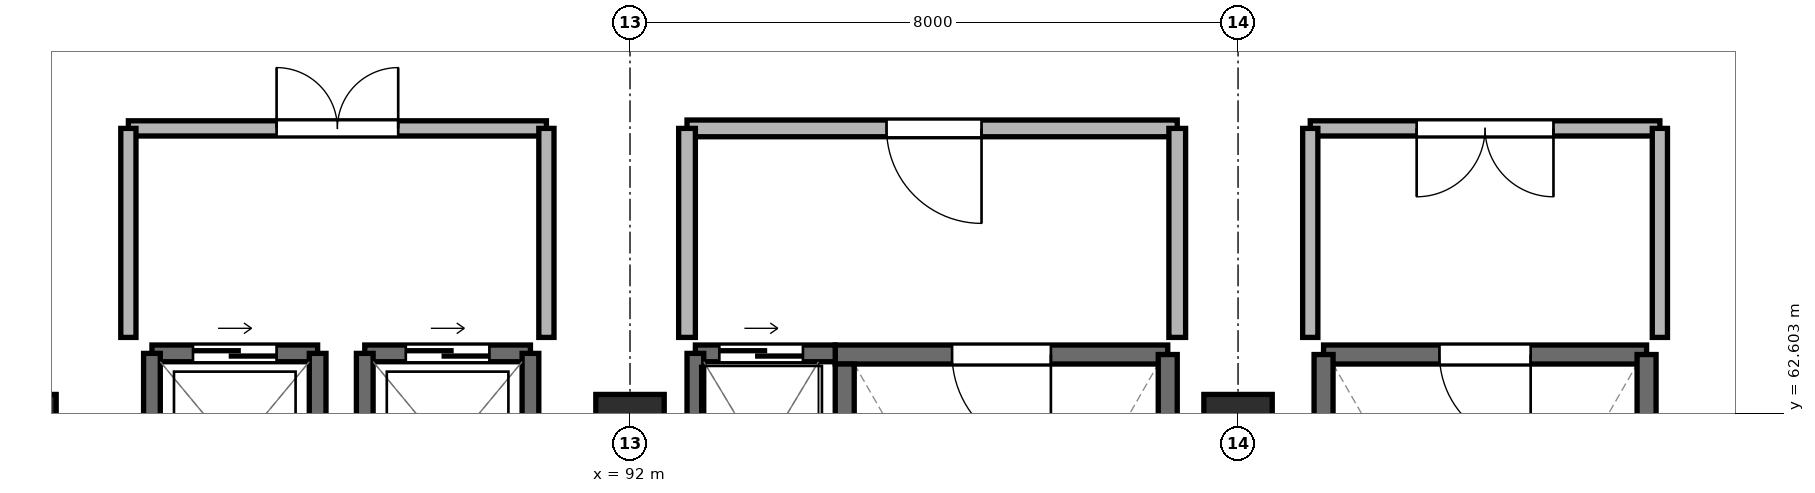
"""IFC4 building model, lengths in metres.
Left out: names, types, materials, properties, quantities, classifications, styles, units other than length and angle.
Written with IfcOpenShell. Run it as: python <this file> out.ifc"""

import sys

from ifc_helpers import new_model, si_unit, direction, frame, frame_2d, origin, origin_2d, place, context, subcontext, project, spatial, rectangle, extrude, element, fill, save


model = new_model("IFC4")
c1 = context("Model", 3, precision=1e-05, world=origin(), true_north=direction((0.0, 1.0)))
c2 = subcontext(c1, "Body", "Model", "MODEL_VIEW")
j1 = project(units=[si_unit("LENGTHUNIT", "METRE"), si_unit("PLANEANGLEUNIT", "RADIAN")], contexts=[c1])
p1 = place(None, origin())
s1 = spatial("IfcSite", under=j1, at=p1, CompositionType="ELEMENT")
p2 = place(p1, origin())
s2 = spatial("IfcBuilding", under=s1, at=p2, CompositionType="ELEMENT")
p3 = place(p2, frame((0.0, 0.0, 30.8)))
s3 = spatial("IfcBuildingStorey", under=s2, at=p3, CompositionType="ELEMENT", Elevation=30.8)
for number, where, z_axis, x_axis in (
    (1, (84.0, 62.4, -0.26), (0.0, 0.0, 1.0), (1.0, 0.0, 0.0)),
    (2, (92.0, 62.4, -0.26), (0.0, 0.0, 1.0), (1.0, 0.0, 0.0)),
    (3, (100.0, 62.4, -0.26), (0.0, 0.0, 1.0), (1.0, 0.0, 0.0)),
):
    element("IfcColumn", number, at=place(p3, frame(where, z_axis=z_axis, x_axis=x_axis)), inside=s3, PredefinedType="COLUMN", context=c2, shape_type="SweptSolid", body=[
        extrude(rectangle(XDim=0.9, YDim=0.9, at=origin_2d()), origin(), (0.0, 0.0, 1.0), 3.26),
    ])
p4 = place(p3, frame((99.075, 63.375, 0.0), z_axis=(0.0, 0.0, 1.0), x_axis=(-1.0, 0.0, 0.0)))
e4 = element("IfcWall", 4, at=p4, inside=s3, PredefinedType="SHEAR", context=c2, shape_type="SweptSolid", body=[
    extrude(rectangle(XDim=4.375, YDim=0.25, at=frame_2d((2.188, 0.0))), origin(), (0.0, 0.0, 1.0), 3.0),
])
p5 = place(p4, frame((1.538, 0.0, 0.0)))
e5 = element("IfcOpeningElement", 5, at=p5, cuts=e4, PredefinedType="OPENING", context=c2, shape_type="SweptSolid", body=[
    extrude(rectangle(XDim=1.3, YDim=2.2, at=frame_2d((0.65, 1.1))), frame((0.0, 0.137, 0.0), z_axis=(0.0, -1.0, 0.0), x_axis=(1.0, 0.0, 0.0)), (0.0, 0.0, 1.0), 0.274),
])
p6 = place(p3, frame((94.825, 63.25, 0.0), z_axis=(0.0, 0.0, 1.0), x_axis=(0.0, -1.0, 0.0)))
e6 = element("IfcWall", 6, at=p6, inside=s3, PredefinedType="SHEAR", context=c2, shape_type="SweptSolid", body=[
    extrude(rectangle(XDim=7.075, YDim=0.25, at=frame_2d((3.538, 0.0))), origin(), (0.0, 0.0, 1.0), 3.0),
])
p7 = place(p3, frame((99.075, 56.175, 0.0), z_axis=(0.0, 0.0, 1.0), x_axis=(0.0, 1.0, 0.0)))
e7 = element("IfcWall", 7, at=p7, inside=s3, PredefinedType="SHEAR", context=c2, shape_type="SweptSolid", body=[
    extrude(rectangle(XDim=7.2, YDim=0.25, at=frame_2d((3.6, 0.0))), origin(), (0.0, 0.0, 1.0), 3.0),
])
p8 = place(p3, frame((105.375, 63.375, 0.0), z_axis=(0.0, 0.0, 1.0), x_axis=(-1.0, 0.0, 0.0)))
e8 = element("IfcWall", 8, at=p8, inside=s3, PredefinedType="SHEAR", context=c2, shape_type="SweptSolid", body=[
    extrude(rectangle(XDim=4.25, YDim=0.25, at=frame_2d((2.125, 0.0))), origin(), (0.0, 0.0, 1.0), 3.0),
])
p9 = place(p8, frame((1.525, 0.0, 0.0)))
e9 = element("IfcOpeningElement", 9, at=p9, cuts=e8, PredefinedType="OPENING", context=c2, shape_type="SweptSolid", body=[
    extrude(rectangle(XDim=1.2, YDim=2.2, at=frame_2d((0.6, 1.1))), frame((0.0, 0.137, 0.0), z_axis=(0.0, -1.0, 0.0), x_axis=(1.0, 0.0, 0.0)), (0.0, 0.0, 1.0), 0.274),
])
for number, where, z_axis, x_axis in (
    (10, (101.125, 63.375, 0.0), (0.0, 0.0, 1.0), (0.0, -1.0, 0.0)),
    (11, (105.375, 56.175, 0.0), (0.0, 0.0, 1.0), (0.0, 1.0, 0.0)),
):
    element("IfcWall", number, at=place(p3, frame(where, z_axis=z_axis, x_axis=x_axis)), inside=s3, PredefinedType="SHEAR", context=c2, shape_type="SweptSolid", body=[
        extrude(rectangle(XDim=7.2, YDim=0.25, at=frame_2d((3.6, 0.0))), origin(), (0.0, 0.0, 1.0), 3.0),
    ])
p10 = place(p3, frame((94.7, 63.39, 0.0), z_axis=(0.0, 0.0, 1.0), x_axis=(-1.0, 0.0, 0.0)))
e12 = element("IfcWall", 12, at=p10, inside=s3, PredefinedType="SHEAR", context=c2, shape_type="SweptSolid", body=[
    extrude(rectangle(XDim=1.84, YDim=0.22, at=frame_2d((0.92, 0.0))), origin(), (0.0, 0.0, 1.0), 3.0),
])
p11 = place(p10, frame((0.425, 0.0, 0.0)))
e13 = element("IfcOpeningElement", 13, at=p11, cuts=e12, PredefinedType="OPENING", context=c2, shape_type="SweptSolid", body=[
    extrude(rectangle(XDim=1.1, YDim=2.2, at=frame_2d((0.55, 1.1))), frame((0.0, 0.122, 0.0), z_axis=(0.0, -1.0, 0.0), x_axis=(1.0, 0.0, 0.0)), (0.0, 0.0, 1.0), 0.244),
])
p12 = place(p3, frame((92.86, 63.39, 0.0), z_axis=(0.0, 0.0, 1.0), x_axis=(0.0, -1.0, 0.0)))
e14 = element("IfcWall", 14, at=p12, inside=s3, PredefinedType="SHEAR", context=c2, shape_type="SweptSolid", body=[
    extrude(rectangle(XDim=2.73, YDim=0.22, at=frame_2d((1.365, 0.0))), origin(), (0.0, 0.0, 1.0), 3.0),
])
p13 = place(p3, frame((87.89, 63.39, 0.0), z_axis=(0.0, 0.0, 1.0), x_axis=(-1.0, 0.0, 0.0)))
e15 = element("IfcWall", 15, at=p13, inside=s3, PredefinedType="SHEAR", context=c2, shape_type="SweptSolid", body=[
    extrude(rectangle(XDim=2.18, YDim=0.22, at=frame_2d((1.09, 0.0))), origin(), (0.0, 0.0, 1.0), 3.0),
])
p14 = place(p13, frame((0.54, 0.0, 0.0)))
e16 = element("IfcOpeningElement", 16, at=p14, cuts=e15, PredefinedType="OPENING", context=c2, shape_type="SweptSolid", body=[
    extrude(rectangle(XDim=1.1, YDim=2.2, at=frame_2d((0.55, 1.1))), frame((0.0, 0.122, 0.0), z_axis=(0.0, -1.0, 0.0), x_axis=(1.0, 0.0, 0.0)), (0.0, 0.0, 1.0), 0.244),
])
for number, where, z_axis, x_axis in (
    (17, (85.71, 63.39, 0.0), (0.0, 0.0, 1.0), (0.0, -1.0, 0.0)),
    (18, (87.89, 60.81, 0.0), (0.0, 0.0, 1.0), (0.0, 1.0, 0.0)),
):
    element("IfcWall", number, at=place(p3, frame(where, z_axis=z_axis, x_axis=x_axis)), inside=s3, PredefinedType="SHEAR", context=c2, shape_type="SweptSolid", body=[
        extrude(rectangle(XDim=2.58, YDim=0.22, at=frame_2d((1.29, 0.0))), origin(), (0.0, 0.0, 1.0), 3.0),
    ])
p15 = place(p3, frame((90.69, 63.39, 0.0), z_axis=(0.0, 0.0, 1.0), x_axis=(-1.0, 0.0, 0.0)))
e19 = element("IfcWall", 19, at=p15, inside=s3, PredefinedType="SHEAR", context=c2, shape_type="SweptSolid", body=[
    extrude(rectangle(XDim=2.18, YDim=0.22, at=frame_2d((1.09, 0.0))), origin(), (0.0, 0.0, 1.0), 3.0),
])
p16 = place(p15, frame((0.54, 0.0, 0.0)))
e20 = element("IfcOpeningElement", 20, at=p16, cuts=e19, PredefinedType="OPENING", context=c2, shape_type="SweptSolid", body=[
    extrude(rectangle(XDim=1.1, YDim=2.2, at=frame_2d((0.55, 1.1))), frame((0.0, 0.122, 0.0), z_axis=(0.0, -1.0, 0.0), x_axis=(1.0, 0.0, 0.0)), (0.0, 0.0, 1.0), 0.244),
])
for number, where, z_axis, x_axis in (
    (21, (88.51, 63.39, 0.0), (0.0, 0.0, 1.0), (0.0, -1.0, 0.0)),
    (22, (90.69, 60.81, 0.0), (0.0, 0.0, 1.0), (0.0, 1.0, 0.0)),
):
    element("IfcWall", number, at=place(p3, frame(where, z_axis=z_axis, x_axis=x_axis)), inside=s3, PredefinedType="SHEAR", context=c2, shape_type="SweptSolid", body=[
        extrude(rectangle(XDim=2.58, YDim=0.22, at=frame_2d((1.29, 0.0))), origin(), (0.0, 0.0, 1.0), 3.0),
    ])
p17 = place(p3, frame((92.75, 66.35, 0.0), z_axis=(0.0, 0.0, 1.0), x_axis=(1.0, 0.0, 0.0)))
e23 = element("IfcWall", 23, at=p17, inside=s3, PredefinedType="PARTITIONING", context=c2, shape_type="SweptSolid", body=[
    extrude(rectangle(XDim=6.45, YDim=0.22, at=frame_2d((3.225, 0.0))), origin(), (0.0, 0.0, 1.0), 2.53),
])
p18 = place(p17, frame((2.625, 0.0, 0.0)))
e24 = element("IfcOpeningElement", 24, at=p18, cuts=e23, PredefinedType="OPENING", context=c2, shape_type="SweptSolid", body=[
    extrude(rectangle(XDim=1.25, YDim=2.2, at=frame_2d((0.625, 1.1))), frame((0.0, 0.122, 0.0), z_axis=(0.0, -1.0, 0.0), x_axis=(1.0, 0.0, 0.0)), (0.0, 0.0, 1.0), 0.244),
])
for number, where, z_axis, x_axis in (
    (25, (92.75, 63.6, 0.0), (0.0, 0.0, 1.0), (0.0, 1.0, 0.0)),
    (26, (99.2, 63.6, 0.0), (0.0, 0.0, 1.0), (0.0, 1.0, 0.0)),
):
    element("IfcWall", number, at=place(p3, frame(where, z_axis=z_axis, x_axis=x_axis)), inside=s3, PredefinedType="PARTITIONING", context=c2, shape_type="SweptSolid", body=[
        extrude(rectangle(XDim=2.75, YDim=0.22, at=frame_2d((1.375, 0.0))), origin(), (0.0, 0.0, 1.0), 2.53),
    ])
p19 = place(p3, frame((85.4, 66.35, 0.0), z_axis=(0.0, 0.0, 1.0), x_axis=(1.0, 0.0, 0.0)))
e27 = element("IfcWall", 27, at=p19, inside=s3, PredefinedType="PARTITIONING", context=c2, shape_type="SweptSolid", body=[
    extrude(rectangle(XDim=5.5, YDim=0.2, at=frame_2d((2.75, 0.0))), origin(), (0.0, 0.0, 1.0), 2.53),
])
p20 = place(p19, frame((1.95, 0.0, 0.0)))
e28 = element("IfcOpeningElement", 28, at=p20, cuts=e27, PredefinedType="OPENING", context=c2, shape_type="SweptSolid", body=[
    extrude(rectangle(XDim=1.6, YDim=2.2, at=frame_2d((0.8, 1.1))), frame((0.0, 0.112, 0.0), z_axis=(0.0, -1.0, 0.0), x_axis=(1.0, 0.0, 0.0)), (0.0, 0.0, 1.0), 0.224),
])
for number, where, z_axis, x_axis in (
    (29, (85.4, 63.6, 0.0), (0.0, 0.0, 1.0), (0.0, 1.0, 0.0)),
    (30, (90.9, 63.6, 0.0), (0.0, 0.0, 1.0), (0.0, 1.0, 0.0)),
):
    element("IfcWall", number, at=place(p3, frame(where, z_axis=z_axis, x_axis=x_axis)), inside=s3, PredefinedType="PARTITIONING", context=c2, shape_type="SweptSolid", body=[
        extrude(rectangle(XDim=2.75, YDim=0.2, at=frame_2d((1.375, 0.0))), origin(), (0.0, 0.0, 1.0), 2.53),
    ])
p21 = place(p3, frame((100.95, 66.35, 0.0), z_axis=(0.0, 0.0, 1.0), x_axis=(1.0, 0.0, 0.0)))
e31 = element("IfcWall", 31, at=p21, inside=s3, PredefinedType="PARTITIONING", context=c2, shape_type="SweptSolid", body=[
    extrude(rectangle(XDim=4.6, YDim=0.2, at=frame_2d((2.3, 0.0))), origin(), (0.0, 0.0, 1.0), 2.53),
])
p22 = place(p21, frame((1.4, 0.0, 0.0)))
e32 = element("IfcOpeningElement", 32, at=p22, cuts=e31, PredefinedType="OPENING", context=c2, shape_type="SweptSolid", body=[
    extrude(rectangle(XDim=1.8, YDim=2.2, at=frame_2d((0.9, 1.1))), frame((0.0, 0.112, 0.0), z_axis=(0.0, -1.0, 0.0), x_axis=(1.0, 0.0, 0.0)), (0.0, 0.0, 1.0), 0.224),
])
for number, where, z_axis, x_axis in (
    (33, (100.95, 63.6, 0.0), (0.0, 0.0, 1.0), (0.0, 1.0, 0.0)),
    (34, (105.55, 63.6, 0.0), (0.0, 0.0, 1.0), (0.0, 1.0, 0.0)),
):
    element("IfcWall", number, at=place(p3, frame(where, z_axis=z_axis, x_axis=x_axis)), inside=s3, PredefinedType="PARTITIONING", context=c2, shape_type="SweptSolid", body=[
        extrude(rectangle(XDim=2.75, YDim=0.2, at=frame_2d((1.375, 0.0))), origin(), (0.0, 0.0, 1.0), 2.53),
    ])
p23 = place(p5, origin())
e35 = element("IfcDoor", 35, at=p23, inside=s3, OperationType="SINGLE_SWING_LEFT", PredefinedType="DOOR", context=c2, shape_type="SweptSolid", body=[
    extrude(rectangle(XDim=1.3, YDim=2.2, at=frame_2d((0.65, 1.1))), frame((0.0, 0.025, 0.0), z_axis=(0.0, -1.0, 0.0), x_axis=(1.0, 0.0, 0.0)), (0.0, 0.0, 1.0), 0.05),
])
fill(e5, e35)
p24 = place(p9, origin())
e36 = element("IfcDoor", 36, at=p24, inside=s3, OperationType="SINGLE_SWING_LEFT", PredefinedType="DOOR", context=c2, shape_type="SweptSolid", body=[
    extrude(rectangle(XDim=1.2, YDim=2.2, at=frame_2d((0.6, 1.1))), frame((0.0, 0.025, 0.0), z_axis=(0.0, -1.0, 0.0), x_axis=(1.0, 0.0, 0.0)), (0.0, 0.0, 1.0), 0.05),
])
fill(e9, e36)
p25 = place(p11, origin())
e37 = element("IfcDoor", 37, at=p25, inside=s3, OperationType="SLIDING_TO_LEFT", PredefinedType="DOOR", context=c2, shape_type="SweptSolid", body=[
    extrude(rectangle(XDim=1.1, YDim=2.2, at=frame_2d((0.55, 1.1))), frame((0.0, 0.025, 0.0), z_axis=(0.0, -1.0, 0.0), x_axis=(1.0, 0.0, 0.0)), (0.0, 0.0, 1.0), 0.05),
])
fill(e13, e37)
p26 = place(p14, origin())
e38 = element("IfcDoor", 38, at=p26, inside=s3, OperationType="SLIDING_TO_LEFT", PredefinedType="DOOR", context=c2, shape_type="SweptSolid", body=[
    extrude(rectangle(XDim=1.1, YDim=2.2, at=frame_2d((0.55, 1.1))), frame((0.0, 0.025, 0.0), z_axis=(0.0, -1.0, 0.0), x_axis=(1.0, 0.0, 0.0)), (0.0, 0.0, 1.0), 0.05),
])
fill(e16, e38)
p27 = place(p16, origin())
e39 = element("IfcDoor", 39, at=p27, inside=s3, OperationType="SLIDING_TO_LEFT", PredefinedType="DOOR", context=c2, shape_type="SweptSolid", body=[
    extrude(rectangle(XDim=1.1, YDim=2.2, at=frame_2d((0.55, 1.1))), frame((0.0, 0.025, 0.0), z_axis=(0.0, -1.0, 0.0), x_axis=(1.0, 0.0, 0.0)), (0.0, 0.0, 1.0), 0.05),
])
fill(e20, e39)
p28 = place(p18, frame((1.25, 0.0, 0.0), z_axis=(0.0, 0.0, 1.0), x_axis=(-1.0, 0.0, 0.0)))
e40 = element("IfcDoor", 40, at=p28, inside=s3, OperationType="SINGLE_SWING_RIGHT", PredefinedType="DOOR", context=c2, shape_type="SweptSolid", body=[
    extrude(rectangle(XDim=1.25, YDim=2.2, at=frame_2d((0.625, 1.1))), frame((0.0, 0.025, 0.0), z_axis=(0.0, -1.0, 0.0), x_axis=(1.0, 0.0, 0.0)), (0.0, 0.0, 1.0), 0.05),
])
fill(e24, e40)
p29 = place(p20, origin())
e41 = element("IfcDoor", 41, at=p29, inside=s3, OperationType="DOUBLE_DOOR_SINGLE_SWING", PredefinedType="DOOR", context=c2, shape_type="SweptSolid", body=[
    extrude(rectangle(XDim=1.6, YDim=2.2, at=frame_2d((0.8, 1.1))), frame((0.0, 0.025, 0.0), z_axis=(0.0, -1.0, 0.0), x_axis=(1.0, 0.0, 0.0)), (0.0, 0.0, 1.0), 0.05),
])
fill(e28, e41)
p30 = place(p22, frame((1.8, 0.0, 0.0), z_axis=(0.0, 0.0, 1.0), x_axis=(-1.0, 0.0, 0.0)))
e42 = element("IfcDoor", 42, at=p30, inside=s3, OperationType="DOUBLE_DOOR_SINGLE_SWING", PredefinedType="DOOR", context=c2, shape_type="SweptSolid", body=[
    extrude(rectangle(XDim=1.8, YDim=2.2, at=frame_2d((0.9, 1.1))), frame((0.0, 0.025, 0.0), z_axis=(0.0, -1.0, 0.0), x_axis=(1.0, 0.0, 0.0)), (0.0, 0.0, 1.0), 0.05),
])
fill(e32, e42)
save(model, sys.argv[1])
